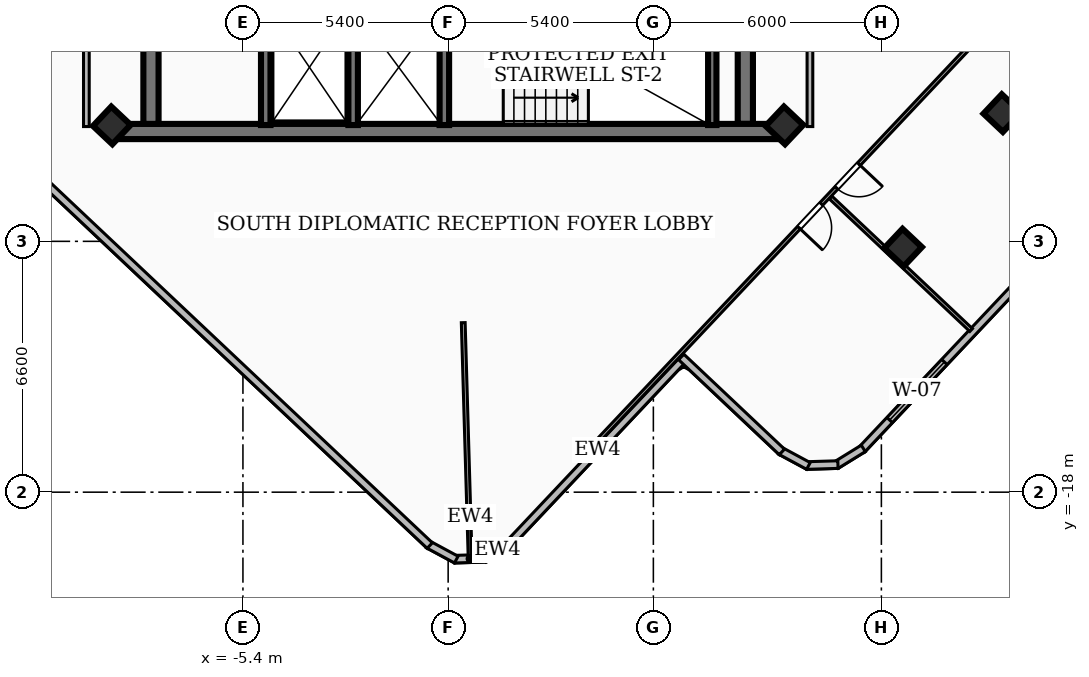
"""IFC4 building model, lengths in metres.
Left out: names, types, materials, properties, quantities, classifications, styles, units other than length and angle.
Written with IfcOpenShell. Run it as: python <this file> out.ifc"""

import sys

from ifc_helpers import new_model, si_unit, direction, frame, frame_2d, origin, origin_2d, place, context, subcontext, project, spatial, rectangle, extrude, element, fill, save


model = new_model("IFC4")
c1 = context("Model", 3, precision=1e-05, world=origin(), true_north=direction((0.0, 1.0)))
c2 = subcontext(c1, "Body", "Model", "MODEL_VIEW")
j1 = project(units=[si_unit("LENGTHUNIT", "METRE"), si_unit("PLANEANGLEUNIT", "RADIAN")], contexts=[c1])
p1 = place(None, origin())
s1 = spatial("IfcSite", under=j1, at=p1, CompositionType="ELEMENT")
p2 = place(p1, origin())
s2 = spatial("IfcBuilding", under=s1, at=p2, CompositionType="ELEMENT")
p3 = place(p2, frame((0.0, 0.0, 247.5)))
s3 = spatial("IfcBuildingStorey", under=s2, at=p3, CompositionType="ELEMENT", Elevation=247.5)
p4 = place(p3, frame((8.78, -8.51, 0.0), z_axis=(0.0, 0.0, 1.0), x_axis=(-1.0, 0.0, 0.0)))
e1 = element("IfcWall", 1, at=p4, inside=s3, PredefinedType="SHEAR", context=c2, shape_type="SweptSolid", body=[
    extrude(rectangle(XDim=17.56, YDim=0.4, at=frame_2d((8.78, 0.0))), origin(), (0.0, 0.0, 1.0), 3.16),
])
for number, where, z_axis, x_axis in (
    (2, (-7.82, -8.31, 0.0), (0.0, 0.0, 1.0), (0.0, 1.0, 0.0)),
    (3, (7.82, -1.95, 0.0), (0.0, 0.0, 1.0), (0.0, -1.0, 0.0)),
):
    element("IfcWall", number, at=place(p3, frame(where, z_axis=z_axis, x_axis=x_axis)), inside=s3, PredefinedType="SHEAR", context=c2, shape_type="SweptSolid", body=[
        extrude(rectangle(XDim=6.36, YDim=0.4, at=frame_2d((3.18, 0.0))), origin(), (0.0, 0.0, 1.0), 3.16),
    ])
p5 = place(p3, frame((6.95, -8.34, 0.0), z_axis=(0.0, 0.0, 1.0), x_axis=(0.0, 1.0, 0.0)))
e4 = element("IfcWall", 4, at=p5, inside=s3, PredefinedType="SOLIDWALL", context=c2, shape_type="SweptSolid", body=[
    extrude(rectangle(XDim=3.06, YDim=0.22, at=frame_2d((1.53, 0.0))), origin(), (0.0, 0.0, 1.0), 3.16),
])
for number, where, z_axis, x_axis in (
    (5, (-0.1, -8.34, 0.0), (0.0, 0.0, 1.0), (0.0, 1.0, 0.0)),
    (6, (-2.5, -8.34, 0.0), (0.0, 0.0, 1.0), (0.0, 1.0, 0.0)),
    (7, (-4.8, -8.34, 0.0), (0.0, 0.0, 1.0), (0.0, 1.0, 0.0)),
):
    element("IfcWall", number, at=place(p3, frame(where, z_axis=z_axis, x_axis=x_axis)), inside=s3, PredefinedType="SOLIDWALL", context=c2, shape_type="SweptSolid", body=[
        extrude(rectangle(XDim=3.04, YDim=0.25, at=frame_2d((1.52, 0.0))), origin(), (0.0, 0.0, 1.0), 3.16),
    ])
for number, where, z_axis, x_axis in (
    (8, (8.85, -8.35, 0.0), (0.0, 0.0, 1.0), (0.686, 0.728, 0.0)),
    (9, (-8.85, -8.35, 0.0), (0.0, 0.0, 1.0), (0.686, 0.728, 0.0)),
    (10, (11.971, -11.566, 0.0), (0.0, 0.0, 1.0), (0.686, 0.728, 0.0)),
    (11, (14.583, -8.026, 0.0), (0.0, 0.0, 1.0), (0.686, 0.728, 0.0)),
):
    element("IfcColumn", number, at=place(p3, frame(where, z_axis=z_axis, x_axis=x_axis)), inside=s3, PredefinedType="COLUMN", context=c2, shape_type="SweptSolid", body=[
        extrude(rectangle(XDim=0.7, YDim=0.7, at=origin_2d()), origin(), (0.0, 0.0, 1.0), 3.42),
    ])
p6 = place(p3, frame((6.246, -14.439, 0.0), z_axis=(0.0, 0.0, 1.0), x_axis=(-0.686109803758, -0.727497998064, 0.0)))
e12 = element("IfcWall", 12, at=p6, inside=s3, PredefinedType="SOLIDWALL", context=c2, shape_type="SweptSolid", body=[
    extrude(rectangle(XDim=6.742, YDim=0.2, at=frame_2d((3.371, 0.0))), origin(), (0.0, 0.0, 1.0), 3.16),
])
p7 = place(p3, frame((1.658, -19.313, 0.0), z_axis=(0.0, 0.0, 1.0), x_axis=(-0.850997215859, -0.52517019965, 0.0)))
e13 = element("IfcWall", 13, at=p7, inside=s3, PredefinedType="SOLIDWALL", context=c2, shape_type="SweptSolid", body=[
    extrude(rectangle(XDim=0.838, YDim=0.2, at=frame_2d((0.419, 0.0))), origin(), (0.0, 0.0, 1.0), 3.16),
])
p8 = place(p3, frame((0.991, -19.739, 0.0), z_axis=(0.0, 0.0, 1.0), x_axis=(-0.999578691641, -0.029024803491, 0.0)))
e14 = element("IfcWall", 14, at=p8, inside=s3, PredefinedType="SOLIDWALL", context=c2, shape_type="SweptSolid", body=[
    extrude(rectangle(XDim=0.824, YDim=0.2, at=frame_2d((0.412, 0.0))), origin(), (0.0, 0.0, 1.0), 3.16),
])
p9 = place(p3, frame((0.214, -19.774, 0.0), z_axis=(0.0, 0.0, 1.0), x_axis=(-0.880199822755, 0.474603278561, 0.0)))
e15 = element("IfcWall", 15, at=p9, inside=s3, PredefinedType="SOLIDWALL", context=c2, shape_type="SweptSolid", body=[
    extrude(rectangle(XDim=0.838, YDim=0.2, at=frame_2d((0.419, 0.0))), origin(), (0.0, 0.0, 1.0), 3.16),
])
p10 = place(p3, frame((-0.484, -19.405, 0.0), z_axis=(0.0, 0.0, 1.0), x_axis=(-0.727540784645, 0.686064433328, 0.0)))
e16 = element("IfcWall", 16, at=p10, inside=s3, PredefinedType="SOLIDWALL", context=c2, shape_type="SweptSolid", body=[
    extrude(rectangle(XDim=25.923, YDim=0.2, at=frame_2d((12.961, 0.0))), origin(), (0.0, 0.0, 1.0), 3.16),
])
p11 = place(p10, frame((19.02, 0.0, 0.85)))
e17 = element("IfcOpeningElement", 17, at=p11, cuts=e16, PredefinedType="OPENING", context=c2, shape_type="SweptSolid", body=[
    extrude(rectangle(XDim=2.4, YDim=2.1, at=frame_2d((1.2, 1.05))), frame((0.0, 0.11, 0.0), z_axis=(0.0, -1.0, 0.0), x_axis=(1.0, 0.0, 0.0)), (0.0, 0.0, 1.0), 0.22),
])
p12 = place(p3, frame((14.778, -5.275, 0.0), z_axis=(0.0, 0.0, 1.0), x_axis=(0.727262285553, -0.686359649172, 0.0)))
e18 = element("IfcWall", 18, at=p12, inside=s3, PredefinedType="SOLIDWALL", context=c2, shape_type="SweptSolid", body=[
    extrude(rectangle(XDim=3.641, YDim=0.2, at=frame_2d((1.82, 0.0))), origin(), (0.0, 0.0, 1.0), 3.16),
])
p13 = place(p3, frame((17.488, -9.878, 0.0), z_axis=(0.0, 0.0, 1.0), x_axis=(-0.686075032126, -0.727530789928, 0.0)))
e19 = element("IfcWall", 19, at=p13, inside=s3, PredefinedType="SOLIDWALL", context=c2, shape_type="SweptSolid", body=[
    extrude(rectangle(XDim=9.623, YDim=0.2, at=frame_2d((4.812, 0.0))), origin(), (0.0, 0.0, 1.0), 3.16),
])
p14 = place(p13, frame((6.456, 0.0, 0.85)))
e20 = element("IfcOpeningElement", 20, at=p14, cuts=e19, PredefinedType="OPENING", context=c2, shape_type="SweptSolid", body=[
    extrude(rectangle(XDim=2.1, YDim=1.8, at=frame_2d((1.05, 0.9))), frame((0.0, 0.11, 0.0), z_axis=(0.0, -1.0, 0.0), x_axis=(1.0, 0.0, 0.0)), (0.0, 0.0, 1.0), 0.22),
])
p15 = place(p3, frame((10.924, -16.848, 0.0), z_axis=(0.0, 0.0, 1.0), x_axis=(-0.850947362812, -0.525250974033, 0.0)))
e21 = element("IfcWall", 21, at=p15, inside=s3, PredefinedType="SOLIDWALL", context=c2, shape_type="SweptSolid", body=[
    extrude(rectangle(XDim=0.838, YDim=0.2, at=frame_2d((0.419, 0.0))), origin(), (0.0, 0.0, 1.0), 3.16),
])
p16 = place(p3, frame((10.257, -17.274, 0.0), z_axis=(0.0, 0.0, 1.0), x_axis=(-0.999534635062, -0.03050431627, 0.0)))
e22 = element("IfcWall", 22, at=p16, inside=s3, PredefinedType="SOLIDWALL", context=c2, shape_type="SweptSolid", body=[
    extrude(rectangle(XDim=0.824, YDim=0.2, at=frame_2d((0.412, 0.0))), origin(), (0.0, 0.0, 1.0), 3.16),
])
p17 = place(p3, frame((9.48, -17.31, 0.0), z_axis=(0.0, 0.0, 1.0), x_axis=(-0.880199822755, 0.474603278561, 0.0)))
e23 = element("IfcWall", 23, at=p17, inside=s3, PredefinedType="SOLIDWALL", context=c2, shape_type="SweptSolid", body=[
    extrude(rectangle(XDim=0.838, YDim=0.2, at=frame_2d((0.419, 0.0))), origin(), (0.0, 0.0, 1.0), 3.16),
])
p18 = place(p3, frame((8.782, -16.941, 0.0), z_axis=(0.0, 0.0, 1.0), x_axis=(-0.727388601412, 0.686225781019, 0.0)))
e24 = element("IfcWall", 24, at=p18, inside=s3, PredefinedType="SOLIDWALL", context=c2, shape_type="SweptSolid", body=[
    extrude(rectangle(XDim=3.642, YDim=0.2, at=frame_2d((1.821, 0.0))), origin(), (0.0, 0.0, 1.0), 3.16),
])
p19 = place(p3, frame((-9.52, -8.38, 0.0), z_axis=(0.0, 0.0, 1.0), x_axis=(0.0, 1.0, 0.0)))
e25 = element("IfcWall", 25, at=p19, inside=s3, PredefinedType="PARTITIONING", context=c2, shape_type="SweptSolid", body=[
    extrude(rectangle(XDim=6.63, YDim=0.15, at=frame_2d((3.315, 0.0))), origin(), (0.0, 0.0, 1.0), 3.16),
])
p20 = place(p3, frame((9.52, -8.38, 0.0), z_axis=(0.0, 0.0, 1.0), x_axis=(0.0, 1.0, 0.0)))
e26 = element("IfcWall", 26, at=p20, inside=s3, PredefinedType="PARTITIONING", context=c2, shape_type="SweptSolid", body=[
    extrude(rectangle(XDim=6.63, YDim=0.15, at=frame_2d((3.315, 0.0))), origin(), (0.0, 0.0, 1.0), 2.53),
])
p21 = place(p3, frame((0.397, -13.54, 0.0), z_axis=(0.0, 0.0, 1.0), x_axis=(0.029263699144, -0.999571726247, 0.0)))
e27 = element("IfcWall", 27, at=p21, inside=s3, PredefinedType="PARTITIONING", context=c2, shape_type="SweptSolid", body=[
    extrude(rectangle(XDim=6.149, YDim=0.1, at=frame_2d((3.074, 0.0))), origin(), (0.0, 0.0, 1.0), 3.16),
])
p22 = place(p3, frame((10.063, -10.245, 0.0), z_axis=(0.0, 0.0, 1.0), x_axis=(0.727475044052, -0.686134141608, 0.0)))
e28 = element("IfcWall", 28, at=p22, inside=s3, PredefinedType="PARTITIONING", context=c2, shape_type="SweptSolid", body=[
    extrude(rectangle(XDim=5.085, YDim=0.1, at=frame_2d((2.542, 0.0))), origin(), (0.0, 0.0, 1.0), 3.16),
])
p23 = place(p3, frame((17.271, -2.514, 0.0), z_axis=(0.0, 0.0, 1.0), x_axis=(-0.686068145865, -0.727537283739, 0.0)))
e29 = element("IfcWall", 29, at=p23, inside=s3, PredefinedType="PARTITIONING", context=c2, shape_type="SweptSolid", body=[
    extrude(rectangle(XDim=20.04, YDim=0.1, at=frame_2d((10.02, 0.0))), origin(), (0.0, 0.0, 1.0), 2.53),
])
p24 = place(p23, frame((10.86, 0.0, 0.0)))
e30 = element("IfcOpeningElement", 30, at=p24, cuts=e29, PredefinedType="OPENING", context=c2, shape_type="SweptSolid", body=[
    extrude(rectangle(XDim=0.86, YDim=2.04, at=frame_2d((0.43, 1.02))), frame((0.0, 0.06, 0.0), z_axis=(0.0, -1.0, 0.0), x_axis=(1.0, 0.0, 0.0)), (0.0, 0.0, 1.0), 0.12),
])
p25 = place(p23, frame((9.42, 0.0, 0.0)))
e31 = element("IfcOpeningElement", 31, at=p25, cuts=e29, PredefinedType="OPENING", context=c2, shape_type="SweptSolid", body=[
    extrude(rectangle(XDim=0.86, YDim=2.04, at=frame_2d((0.43, 1.02))), frame((0.0, 0.06, 0.0), z_axis=(0.0, -1.0, 0.0), x_axis=(1.0, 0.0, 0.0)), (0.0, 0.0, 1.0), 0.12),
])
p26 = place(p14, origin())
e32 = element("IfcWindow", 32, at=p26, inside=s3, PartitioningType="SINGLE_PANEL", PredefinedType="WINDOW", context=c2, shape_type="SweptSolid", body=[
    extrude(rectangle(XDim=2.1, YDim=1.8, at=frame_2d((1.05, 0.9))), frame((0.0, 0.03, 0.0), z_axis=(0.0, -1.0, 0.0), x_axis=(1.0, 0.0, 0.0)), (0.0, 0.0, 1.0), 0.06),
])
fill(e20, e32)
p27 = place(p24, origin())
e33 = element("IfcDoor", 33, at=p27, inside=s3, OperationType="SINGLE_SWING_RIGHT", PredefinedType="DOOR", context=c2, shape_type="SweptSolid", body=[
    extrude(rectangle(XDim=0.86, YDim=2.04, at=frame_2d((0.43, 1.02))), frame((0.0, 0.025, 0.0), z_axis=(0.0, -1.0, 0.0), x_axis=(1.0, 0.0, 0.0)), (0.0, 0.0, 1.0), 0.05),
])
fill(e30, e33)
p28 = place(p25, origin())
e34 = element("IfcDoor", 34, at=p28, inside=s3, OperationType="SINGLE_SWING_LEFT", PredefinedType="DOOR", context=c2, shape_type="SweptSolid", body=[
    extrude(rectangle(XDim=0.86, YDim=2.04, at=frame_2d((0.43, 1.02))), frame((0.0, 0.025, 0.0), z_axis=(0.0, -1.0, 0.0), x_axis=(1.0, 0.0, 0.0)), (0.0, 0.0, 1.0), 0.05),
])
fill(e31, e34)
save(model, sys.argv[1])
